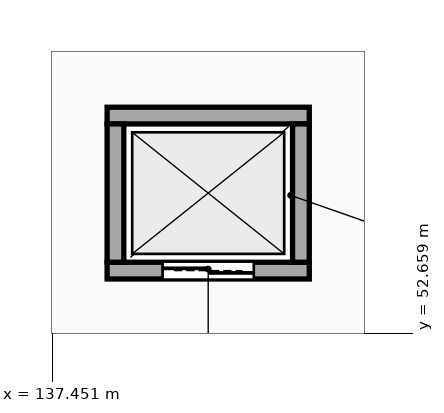
"""IFC4 building model, lengths in metres.
Left out: names, types, materials, properties, quantities, classifications, styles, units other than length and angle.
Written with IfcOpenShell. Run it as: python <this file> out.ifc"""

import sys

from ifc_helpers import new_model, si_unit, direction, frame, frame_2d, origin, place, context, subcontext, project, spatial, rectangle, extrude, element, fill, save


model = new_model("IFC4")
c1 = context("Model", 3, precision=1e-05, world=origin(), true_north=direction((0.0, 1.0)))
c2 = subcontext(c1, "Body", "Model", "MODEL_VIEW")
j1 = project(units=[si_unit("LENGTHUNIT", "METRE"), si_unit("PLANEANGLEUNIT", "RADIAN")], contexts=[c1])
p1 = place(None, origin())
s1 = spatial("IfcSite", under=j1, at=p1, CompositionType="ELEMENT")
p2 = place(p1, origin())
s2 = spatial("IfcBuilding", under=s1, at=p2, CompositionType="ELEMENT")
p3 = place(p2, frame((0.0, 0.0, 5.4)))
s3 = spatial("IfcBuildingStorey", under=s2, at=p3, CompositionType="ELEMENT", Elevation=5.4)
p4 = place(p3, frame((138.17, 53.48, 0.0), z_axis=(0.0, 0.0, 1.0), x_axis=(1.0, 0.0, 0.0)))
e1 = element("IfcWall", 1, at=p4, inside=s3, PredefinedType="STANDARD", context=c2, shape_type="SweptSolid", body=[
    extrude(rectangle(XDim=2.66, YDim=0.22, at=frame_2d((1.33, 0.0))), origin(), (0.0, 0.0, 1.0), 5.12),
])
p5 = place(p4, frame((0.73, 0.0, 0.0)))
e2 = element("IfcOpeningElement", 2, at=p5, cuts=e1, PredefinedType="OPENING", context=c2, shape_type="SweptSolid", body=[
    extrude(rectangle(XDim=1.2, YDim=2.2, at=frame_2d((0.6, 1.1))), frame((0.0, 0.12, 0.0), z_axis=(0.0, -1.0, 0.0), x_axis=(1.0, 0.0, 0.0)), (0.0, 0.0, 1.0), 0.24),
])
p6 = place(p3, frame((140.83, 55.52, 0.0), z_axis=(0.0, 0.0, 1.0), x_axis=(-1.0, 0.0, 0.0)))
e3 = element("IfcWall", 3, at=p6, inside=s3, PredefinedType="STANDARD", context=c2, shape_type="SweptSolid", body=[
    extrude(rectangle(XDim=2.66, YDim=0.22, at=frame_2d((1.33, 0.0))), origin(), (0.0, 0.0, 1.0), 5.12),
])
for number, where, z_axis, x_axis in (
    (4, (138.28, 55.41, 0.0), (0.0, 0.0, 1.0), (0.0, -1.0, 0.0)),
    (5, (140.72, 53.59, 0.0), (0.0, 0.0, 1.0), (0.0, 1.0, 0.0)),
):
    element("IfcWall", number, at=place(p3, frame(where, z_axis=z_axis, x_axis=x_axis)), inside=s3, PredefinedType="STANDARD", context=c2, shape_type="SweptSolid", body=[
        extrude(rectangle(XDim=1.82, YDim=0.22, at=frame_2d((0.91, 0.0))), origin(), (0.0, 0.0, 1.0), 5.12),
    ])
p7 = place(p5, origin())
e6 = element("IfcDoor", 6, at=p7, inside=s3, OperationType="DOUBLE_DOOR_SLIDING", PredefinedType="DOOR", context=c2, shape_type="SweptSolid", body=[
    extrude(rectangle(XDim=1.2, YDim=2.2, at=frame_2d((0.6, 1.1))), frame((0.0, 0.025, 0.0), z_axis=(0.0, -1.0, 0.0), x_axis=(1.0, 0.0, 0.0)), (0.0, 0.0, 1.0), 0.05),
])
fill(e2, e6)
save(model, sys.argv[1])
